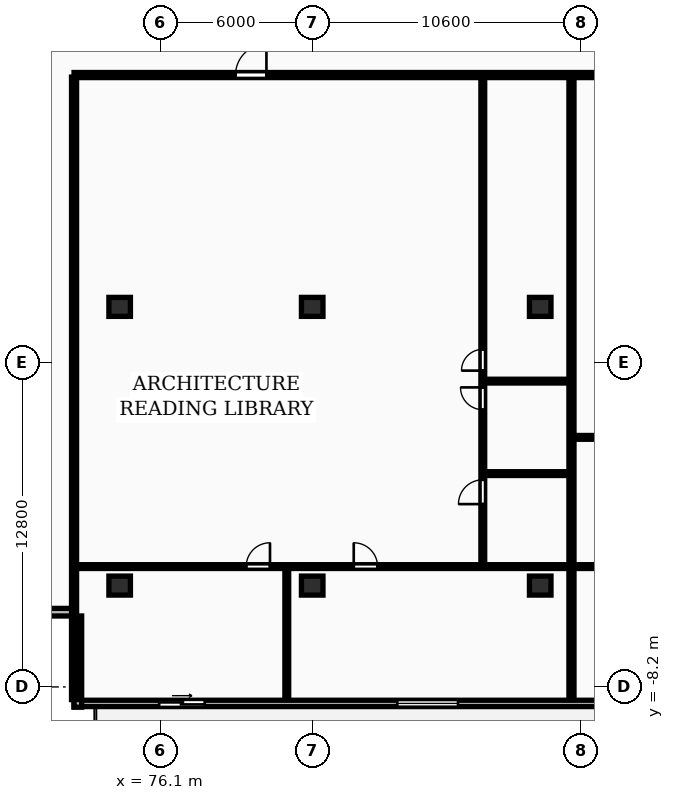
"""IFC4 building model, lengths in metres.
Left out: names, types, materials, properties, quantities, classifications, styles, units other than length and angle.
Written with IfcOpenShell. Run it as: python <this file> out.ifc"""

import sys

from ifc_helpers import new_model, si_unit, direction, frame, frame_2d, origin, origin_2d, place, context, subcontext, project, spatial, rectangle, extrude, element, fill, save


model = new_model("IFC4")
c1 = context("Model", 3, precision=1e-05, world=origin(), true_north=direction((0.0, 1.0)))
c2 = subcontext(c1, "Body", "Model", "MODEL_VIEW")
j1 = project(units=[si_unit("LENGTHUNIT", "METRE"), si_unit("PLANEANGLEUNIT", "RADIAN")], contexts=[c1])
p1 = place(None, origin())
s1 = spatial("IfcSite", under=j1, at=p1, CompositionType="ELEMENT")
p2 = place(p1, origin())
s2 = spatial("IfcBuilding", under=s1, at=p2, CompositionType="ELEMENT")
p3 = place(p2, frame((0.0, 0.0, 106.8)))
s3 = spatial("IfcBuildingStorey", under=s2, at=p3, CompositionType="ELEMENT", Elevation=106.8)
for number, where, z_axis, x_axis in (
    (1, (74.5, -4.2, 0.0), (0.0, 0.0, 1.0), (1.0, 0.0, 0.0)),
    (2, (74.5, 6.8, 0.0), (0.0, 0.0, 1.0), (1.0, 0.0, 0.0)),
    (3, (82.1, -4.2, 0.0), (0.0, 0.0, 1.0), (1.0, 0.0, 0.0)),
    (4, (82.1, 6.8, 0.0), (0.0, 0.0, 1.0), (1.0, 0.0, 0.0)),
    (5, (91.1, -4.2, 0.0), (0.0, 0.0, 1.0), (1.0, 0.0, 0.0)),
    (6, (91.1, 6.8, 0.0), (0.0, 0.0, 1.0), (1.0, 0.0, 0.0)),
):
    element("IfcColumn", number, at=place(p3, frame(where, z_axis=z_axis, x_axis=x_axis)), inside=s3, PredefinedType="COLUMN", context=c2, shape_type="SweptSolid", body=[
        extrude(rectangle(XDim=0.85, YDim=0.75, at=origin_2d()), origin(), (0.0, 0.0, 1.0), 3.25),
    ])
p4 = place(p3, frame((72.7, -8.85, 0.0), z_axis=(0.0, 0.0, 1.0), x_axis=(1.0, 0.0, 0.0)))
e7 = element("IfcWall", 7, at=p4, inside=s3, PredefinedType="STANDARD", context=c2, shape_type="SweptSolid", body=[
    extrude(rectangle(XDim=58.0, YDim=0.25, at=frame_2d((29.0, 0.0))), origin(), (0.0, 0.0, 1.0), 2.97),
])
p5 = place(p4, frame((3.358, 0.0, 0.0)))
e8 = element("IfcOpeningElement", 8, at=p5, cuts=e7, PredefinedType="OPENING", context=c2, shape_type="SweptSolid", body=[
    extrude(rectangle(XDim=1.8, YDim=2.2, at=frame_2d((0.9, 1.1))), frame((0.0, 0.135, 0.0), z_axis=(0.0, -1.0, 0.0), x_axis=(1.0, 0.0, 0.0)), (0.0, 0.0, 1.0), 0.27),
])
p6 = place(p4, frame((12.755, 0.0, 0.85)))
e9 = element("IfcOpeningElement", 9, at=p6, cuts=e7, PredefinedType="OPENING", context=c2, shape_type="SweptSolid", body=[
    extrude(rectangle(XDim=2.4, YDim=1.9, at=frame_2d((1.2, 0.95))), frame((0.0, 0.135, 0.0), z_axis=(0.0, -1.0, 0.0), x_axis=(1.0, 0.0, 0.0)), (0.0, 0.0, 1.0), 0.27),
])
p7 = place(p4, frame((23.617, 0.0, 0.0)))
e10 = element("IfcOpeningElement", 10, at=p7, cuts=e7, PredefinedType="OPENING", context=c2, shape_type="SweptSolid", body=[
    extrude(rectangle(XDim=1.8, YDim=2.2, at=frame_2d((0.9, 1.1))), frame((0.0, 0.135, 0.0), z_axis=(0.0, -1.0, 0.0), x_axis=(1.0, 0.0, 0.0)), (0.0, 0.0, 1.0), 0.27),
])
p8 = place(p4, frame((29.705, 0.0, 0.85)))
e11 = element("IfcOpeningElement", 11, at=p8, cuts=e7, PredefinedType="OPENING", context=c2, shape_type="SweptSolid", body=[
    extrude(rectangle(XDim=1.8, YDim=1.8, at=frame_2d((0.9, 0.9))), frame((0.0, 0.135, 0.0), z_axis=(0.0, -1.0, 0.0), x_axis=(1.0, 0.0, 0.0)), (0.0, 0.0, 1.0), 0.27),
])
p9 = place(p4, frame((36.417, 0.0, 0.0)))
e12 = element("IfcOpeningElement", 12, at=p9, cuts=e7, PredefinedType="OPENING", context=c2, shape_type="SweptSolid", body=[
    extrude(rectangle(XDim=1.8, YDim=2.2, at=frame_2d((0.9, 1.1))), frame((0.0, 0.135, 0.0), z_axis=(0.0, -1.0, 0.0), x_axis=(1.0, 0.0, 0.0)), (0.0, 0.0, 1.0), 0.27),
])
p10 = place(p4, frame((43.213, 0.0, 0.85)))
e13 = element("IfcOpeningElement", 13, at=p10, cuts=e7, PredefinedType="OPENING", context=c2, shape_type="SweptSolid", body=[
    extrude(rectangle(XDim=1.8, YDim=1.8, at=frame_2d((0.9, 0.9))), frame((0.0, 0.135, 0.0), z_axis=(0.0, -1.0, 0.0), x_axis=(1.0, 0.0, 0.0)), (0.0, 0.0, 1.0), 0.27),
])
p11 = place(p4, frame((49.262, 0.0, 0.0)))
e14 = element("IfcOpeningElement", 14, at=p11, cuts=e7, PredefinedType="OPENING", context=c2, shape_type="SweptSolid", body=[
    extrude(rectangle(XDim=1.8, YDim=2.2, at=frame_2d((0.9, 1.1))), frame((0.0, 0.135, 0.0), z_axis=(0.0, -1.0, 0.0), x_axis=(1.0, 0.0, 0.0)), (0.0, 0.0, 1.0), 0.27),
])
p12 = place(p4, frame((54.9, 0.0, 0.85)))
e15 = element("IfcOpeningElement", 15, at=p12, cuts=e7, PredefinedType="OPENING", context=c2, shape_type="SweptSolid", body=[
    extrude(rectangle(XDim=2.4, YDim=1.9, at=frame_2d((1.2, 0.95))), frame((0.0, 0.135, 0.0), z_axis=(0.0, -1.0, 0.0), x_axis=(1.0, 0.0, 0.0)), (0.0, 0.0, 1.0), 0.27),
])
p13 = place(p3, frame((69.1, -5.25, 0.0), z_axis=(0.0, 0.0, 1.0), x_axis=(1.0, 0.0, 0.0)))
e16 = element("IfcWall", 16, at=p13, inside=s3, PredefinedType="STANDARD", context=c2, shape_type="SweptSolid", body=[
    extrude(rectangle(XDim=3.6, YDim=0.3, at=frame_2d((1.8, 0.0))), origin(), (0.0, 0.0, 1.0), 2.97),
])
p14 = place(p3, frame((72.85, -5.4, 0.0), z_axis=(0.0, 0.0, 1.0), x_axis=(0.0, -1.0, 0.0)))
e17 = element("IfcWall", 17, at=p14, inside=s3, PredefinedType="STANDARD", context=c2, shape_type="SweptSolid", body=[
    extrude(rectangle(XDim=3.6, YDim=0.3, at=frame_2d((1.8, 0.0))), origin(), (0.0, 0.0, 1.0), 2.97),
])
for number, where, z_axis, x_axis in (
    (18, (72.7, -8.7, 0.0), (0.0, 0.0, 1.0), (0.0, 1.0, 0.0)),
    (19, (92.333, -8.7, 0.0), (0.0, 0.0, 1.0), (0.0, 1.0, 0.0)),
):
    element("IfcWall", number, at=place(p3, frame(where, z_axis=z_axis, x_axis=x_axis)), inside=s3, PredefinedType="PARTITIONING", context=c2, shape_type="SweptSolid", body=[
        extrude(rectangle(XDim=24.57, YDim=0.2, at=frame_2d((12.285, 0.0))), origin(), (0.0, 0.0, 1.0), 2.97),
    ])
for number, where, z_axis, x_axis in (
    (20, (88.893, 0.22, 0.0), (0.0, 0.0, 1.0), (1.0, 0.0, 0.0)),
    (21, (88.893, 3.87, 0.0), (0.0, 0.0, 1.0), (1.0, 0.0, 0.0)),
):
    element("IfcWall", number, at=place(p3, frame(where, z_axis=z_axis, x_axis=x_axis)), inside=s3, PredefinedType="PARTITIONING", context=c2, shape_type="SweptSolid", body=[
        extrude(rectangle(XDim=3.36, YDim=0.15, at=frame_2d((1.68, 0.0))), origin(), (0.0, 0.0, 1.0), 2.97),
    ])
p15 = place(p3, frame((88.833, -3.39, 0.0), z_axis=(0.0, 0.0, 1.0), x_axis=(0.0, 1.0, 0.0)))
e22 = element("IfcWall", 22, at=p15, inside=s3, PredefinedType="PARTITIONING", context=c2, shape_type="SweptSolid", body=[
    extrude(rectangle(XDim=19.28, YDim=0.15, at=frame_2d((9.64, 0.0))), origin(), (0.0, 0.0, 1.0), 2.97),
])
p16 = place(p15, frame((2.406, 0.0, 0.0)))
e23 = element("IfcOpeningElement", 23, at=p16, cuts=e22, PredefinedType="OPENING", context=c2, shape_type="SweptSolid", body=[
    extrude(rectangle(XDim=0.96, YDim=2.1, at=frame_2d((0.48, 1.05))), frame((0.0, 0.085, 0.0), z_axis=(0.0, -1.0, 0.0), x_axis=(1.0, 0.0, 0.0)), (0.0, 0.0, 1.0), 0.17),
])
p17 = place(p15, frame((6.133, 0.0, 0.0)))
e24 = element("IfcOpeningElement", 24, at=p17, cuts=e22, PredefinedType="OPENING", context=c2, shape_type="SweptSolid", body=[
    extrude(rectangle(XDim=0.88, YDim=2.06, at=frame_2d((0.44, 1.03))), frame((0.0, 0.085, 0.0), z_axis=(0.0, -1.0, 0.0), x_axis=(1.0, 0.0, 0.0)), (0.0, 0.0, 1.0), 0.17),
])
p18 = place(p15, frame((7.674, 0.0, 0.0)))
e25 = element("IfcOpeningElement", 25, at=p18, cuts=e22, PredefinedType="OPENING", context=c2, shape_type="SweptSolid", body=[
    extrude(rectangle(XDim=0.84, YDim=2.04, at=frame_2d((0.42, 1.02))), frame((0.0, 0.085, 0.0), z_axis=(0.0, -1.0, 0.0), x_axis=(1.0, 0.0, 0.0)), (0.0, 0.0, 1.0), 0.17),
])
p19 = place(p3, frame((81.097, -8.7, 0.0), z_axis=(0.0, 0.0, 1.0), x_axis=(0.0, 1.0, 0.0)))
e26 = element("IfcWall", 26, at=p19, inside=s3, PredefinedType="PARTITIONING", context=c2, shape_type="SweptSolid", body=[
    extrude(rectangle(XDim=5.17, YDim=0.15, at=frame_2d((2.585, 0.0))), origin(), (0.0, 0.0, 1.0), 2.97),
])
p20 = place(p3, frame((72.78, -3.45, 0.0), z_axis=(0.0, 0.0, 1.0), x_axis=(1.0, 0.0, 0.0)))
e27 = element("IfcWall", 27, at=p20, inside=s3, PredefinedType="PARTITIONING", context=c2, shape_type="SweptSolid", body=[
    extrude(rectangle(XDim=19.473, YDim=0.15, at=frame_2d((9.737, 0.0))), origin(), (0.0, 0.0, 1.0), 2.97),
])
p21 = place(p20, frame((6.714, 0.0, 0.0)))
e28 = element("IfcOpeningElement", 28, at=p21, cuts=e27, PredefinedType="OPENING", context=c2, shape_type="SweptSolid", body=[
    extrude(rectangle(XDim=0.94, YDim=2.1, at=frame_2d((0.47, 1.05))), frame((0.0, 0.085, 0.0), z_axis=(0.0, -1.0, 0.0), x_axis=(1.0, 0.0, 0.0)), (0.0, 0.0, 1.0), 0.17),
])
p22 = place(p20, frame((10.959, 0.0, 0.0)))
e29 = element("IfcOpeningElement", 29, at=p22, cuts=e27, PredefinedType="OPENING", context=c2, shape_type="SweptSolid", body=[
    extrude(rectangle(XDim=0.94, YDim=2.1, at=frame_2d((0.47, 1.05))), frame((0.0, 0.085, 0.0), z_axis=(0.0, -1.0, 0.0), x_axis=(1.0, 0.0, 0.0)), (0.0, 0.0, 1.0), 0.17),
])
p23 = place(p3, frame((92.413, 1.65, 0.0), z_axis=(0.0, 0.0, 1.0), x_axis=(1.0, 0.0, 0.0)))
e30 = element("IfcWall", 30, at=p23, inside=s3, PredefinedType="PARTITIONING", context=c2, shape_type="SweptSolid", body=[
    extrude(rectangle(XDim=12.257, YDim=0.15, at=frame_2d((6.128, 0.0))), origin(), (0.0, 0.0, 1.0), 2.97),
])
p24 = place(p23, frame((2.72, 0.0, 0.0)))
e31 = element("IfcOpeningElement", 31, at=p24, cuts=e30, PredefinedType="OPENING", context=c2, shape_type="SweptSolid", body=[
    extrude(rectangle(XDim=0.92, YDim=2.08, at=frame_2d((0.46, 1.04))), frame((0.0, 0.085, 0.0), z_axis=(0.0, -1.0, 0.0), x_axis=(1.0, 0.0, 0.0)), (0.0, 0.0, 1.0), 0.17),
])
p25 = place(p3, frame((92.413, -3.45, 0.0), z_axis=(0.0, 0.0, 1.0), x_axis=(1.0, 0.0, 0.0)))
e32 = element("IfcWall", 32, at=p25, inside=s3, PredefinedType="PARTITIONING", context=c2, shape_type="SweptSolid", body=[
    extrude(rectangle(XDim=12.257, YDim=0.15, at=frame_2d((6.128, 0.0))), origin(), (0.0, 0.0, 1.0), 2.97),
])
p26 = place(p25, frame((5.126, 0.0, 0.0)))
e33 = element("IfcOpeningElement", 33, at=p26, cuts=e32, PredefinedType="OPENING", context=c2, shape_type="SweptSolid", body=[
    extrude(rectangle(XDim=0.94, YDim=2.1, at=frame_2d((0.47, 1.05))), frame((0.0, 0.085, 0.0), z_axis=(0.0, -1.0, 0.0), x_axis=(1.0, 0.0, 0.0)), (0.0, 0.0, 1.0), 0.17),
])
p27 = place(p3, frame((72.7, 15.95, 0.0), z_axis=(0.0, 0.0, 1.0), x_axis=(1.0, 0.0, 0.0)))
e34 = element("IfcWall", 34, at=p27, inside=s3, PredefinedType="PARTITIONING", context=c2, shape_type="SweptSolid", body=[
    extrude(rectangle(XDim=58.0, YDim=0.2, at=frame_2d((29.0, 0.0))), origin(), (0.0, 0.0, 1.0), 2.97),
])
p28 = place(p27, frame((6.373, 0.0, 0.0)))
e35 = element("IfcOpeningElement", 35, at=p28, cuts=e34, PredefinedType="OPENING", context=c2, shape_type="SweptSolid", body=[
    extrude(rectangle(XDim=1.22, YDim=2.18, at=frame_2d((0.61, 1.09))), frame((0.0, 0.11, 0.0), z_axis=(0.0, -1.0, 0.0), x_axis=(1.0, 0.0, 0.0)), (0.0, 0.0, 1.0), 0.22),
])
p29 = place(p27, frame((21.678, 0.0, 0.0)))
e36 = element("IfcOpeningElement", 36, at=p29, cuts=e34, PredefinedType="OPENING", context=c2, shape_type="SweptSolid", body=[
    extrude(rectangle(XDim=0.95, YDim=2.15, at=frame_2d((0.475, 1.075))), frame((0.0, 0.11, 0.0), z_axis=(0.0, -1.0, 0.0), x_axis=(1.0, 0.0, 0.0)), (0.0, 0.0, 1.0), 0.22),
])
p30 = place(p27, frame((33.812, 0.0, 0.0)))
e37 = element("IfcOpeningElement", 37, at=p30, cuts=e34, PredefinedType="OPENING", context=c2, shape_type="SweptSolid", body=[
    extrude(rectangle(XDim=0.95, YDim=2.15, at=frame_2d((0.475, 1.075))), frame((0.0, 0.11, 0.0), z_axis=(0.0, -1.0, 0.0), x_axis=(1.0, 0.0, 0.0)), (0.0, 0.0, 1.0), 0.22),
])
p31 = place(p27, frame((47.928, 0.0, 0.0)))
e38 = element("IfcOpeningElement", 38, at=p31, cuts=e34, PredefinedType="OPENING", context=c2, shape_type="SweptSolid", body=[
    extrude(rectangle(XDim=0.95, YDim=2.15, at=frame_2d((0.475, 1.075))), frame((0.0, 0.11, 0.0), z_axis=(0.0, -1.0, 0.0), x_axis=(1.0, 0.0, 0.0)), (0.0, 0.0, 1.0), 0.22),
])
p32 = place(p5, origin())
e39 = element("IfcDoor", 39, at=p32, inside=s3, OperationType="SLIDING_TO_RIGHT", PredefinedType="DOOR", context=c2, shape_type="SweptSolid", body=[
    extrude(rectangle(XDim=1.8, YDim=2.2, at=frame_2d((0.9, 1.1))), frame((0.0, 0.025, 0.0), z_axis=(0.0, -1.0, 0.0), x_axis=(1.0, 0.0, 0.0)), (0.0, 0.0, 1.0), 0.05),
])
fill(e8, e39)
p33 = place(p6, origin())
e40 = element("IfcWindow", 40, at=p33, inside=s3, PartitioningType="DOUBLE_PANEL_VERTICAL", PredefinedType="WINDOW", context=c2, shape_type="SweptSolid", body=[
    extrude(rectangle(XDim=2.4, YDim=1.9, at=frame_2d((1.2, 0.95))), frame((0.0, 0.03, 0.0), z_axis=(0.0, -1.0, 0.0), x_axis=(1.0, 0.0, 0.0)), (0.0, 0.0, 1.0), 0.06),
])
fill(e9, e40)
p34 = place(p16, origin())
e41 = element("IfcDoor", 41, at=p34, inside=s3, OperationType="SINGLE_SWING_LEFT", PredefinedType="DOOR", context=c2, shape_type="SweptSolid", body=[
    extrude(rectangle(XDim=0.96, YDim=2.1, at=frame_2d((0.48, 1.05))), frame((0.0, 0.025, 0.0), z_axis=(0.0, -1.0, 0.0), x_axis=(1.0, 0.0, 0.0)), (0.0, 0.0, 1.0), 0.05),
])
fill(e23, e41)
p35 = place(p17, origin())
e42 = element("IfcDoor", 42, at=p35, inside=s3, OperationType="SINGLE_SWING_RIGHT", PredefinedType="DOOR", context=c2, shape_type="SweptSolid", body=[
    extrude(rectangle(XDim=0.88, YDim=2.06, at=frame_2d((0.44, 1.03))), frame((0.0, 0.025, 0.0), z_axis=(0.0, -1.0, 0.0), x_axis=(1.0, 0.0, 0.0)), (0.0, 0.0, 1.0), 0.05),
])
fill(e24, e42)
p36 = place(p18, origin())
e43 = element("IfcDoor", 43, at=p36, inside=s3, OperationType="SINGLE_SWING_LEFT", PredefinedType="DOOR", context=c2, shape_type="SweptSolid", body=[
    extrude(rectangle(XDim=0.84, YDim=2.04, at=frame_2d((0.42, 1.02))), frame((0.0, 0.025, 0.0), z_axis=(0.0, -1.0, 0.0), x_axis=(1.0, 0.0, 0.0)), (0.0, 0.0, 1.0), 0.05),
])
fill(e25, e43)
p37 = place(p21, origin())
e44 = element("IfcDoor", 44, at=p37, inside=s3, OperationType="SINGLE_SWING_RIGHT", PredefinedType="DOOR", context=c2, shape_type="SweptSolid", body=[
    extrude(rectangle(XDim=0.94, YDim=2.1, at=frame_2d((0.47, 1.05))), frame((0.0, 0.025, 0.0), z_axis=(0.0, -1.0, 0.0), x_axis=(1.0, 0.0, 0.0)), (0.0, 0.0, 1.0), 0.05),
])
fill(e28, e44)
p38 = place(p22, origin())
e45 = element("IfcDoor", 45, at=p38, inside=s3, OperationType="SINGLE_SWING_LEFT", PredefinedType="DOOR", context=c2, shape_type="SweptSolid", body=[
    extrude(rectangle(XDim=0.94, YDim=2.1, at=frame_2d((0.47, 1.05))), frame((0.0, 0.025, 0.0), z_axis=(0.0, -1.0, 0.0), x_axis=(1.0, 0.0, 0.0)), (0.0, 0.0, 1.0), 0.05),
])
fill(e29, e45)
p39 = place(p28, origin())
e46 = element("IfcDoor", 46, at=p39, inside=s3, OperationType="SINGLE_SWING_RIGHT", PredefinedType="DOOR", context=c2, shape_type="SweptSolid", body=[
    extrude(rectangle(XDim=1.22, YDim=2.18, at=frame_2d((0.61, 1.09))), frame((0.0, 0.025, 0.0), z_axis=(0.0, -1.0, 0.0), x_axis=(1.0, 0.0, 0.0)), (0.0, 0.0, 1.0), 0.05),
])
fill(e35, e46)
save(model, sys.argv[1])
